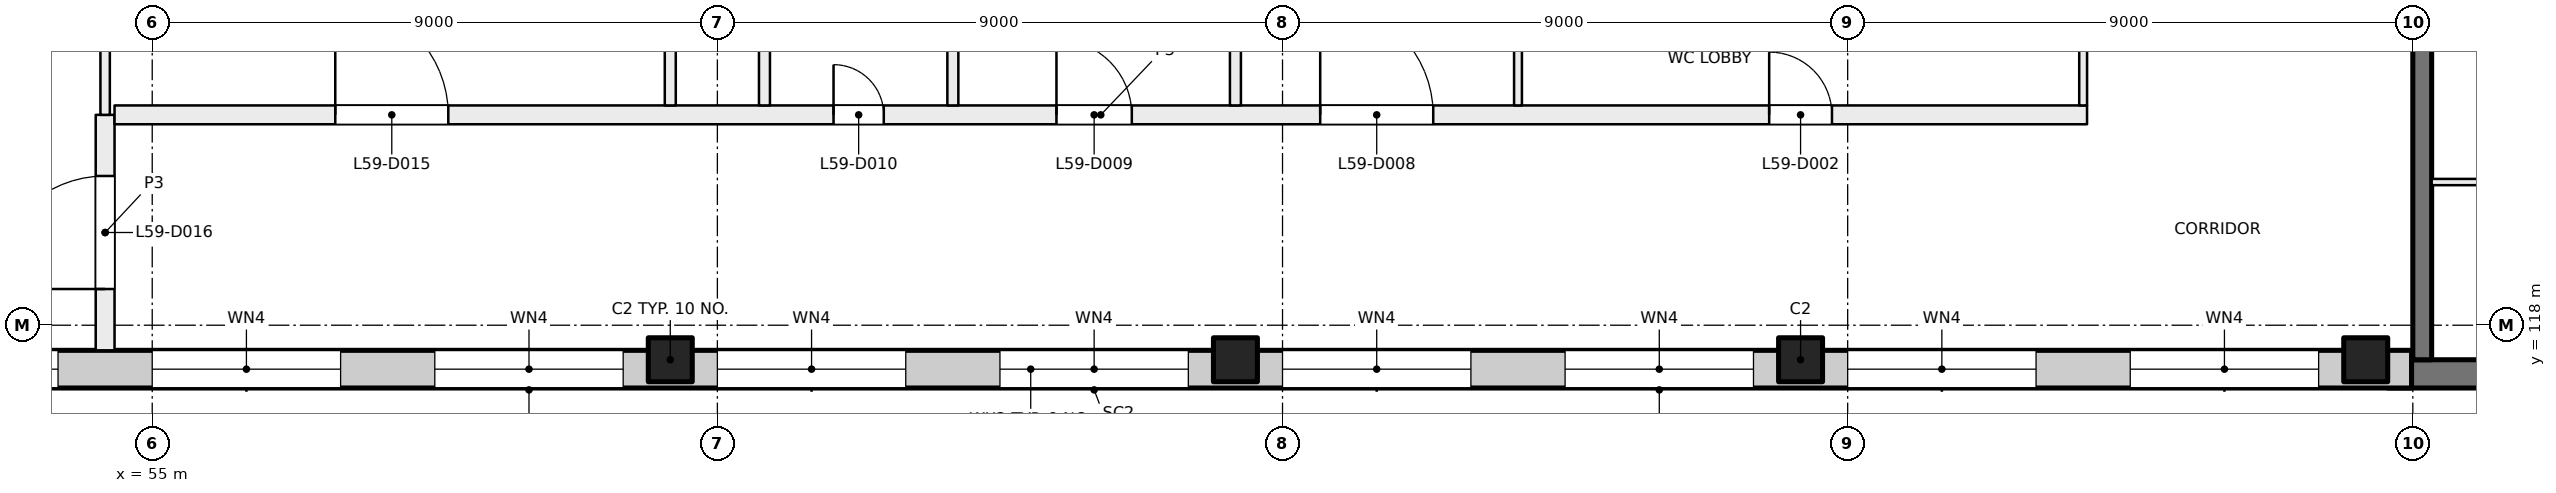
"""IFC4 building model, lengths in metres.
Left out: names, types, materials, properties, quantities, classifications, styles, units other than length and angle.
Written with IfcOpenShell. Run it as: python <this file> out.ifc"""

import sys

from ifc_helpers import new_model, si_unit, direction, frame, frame_2d, origin, origin_2d, place, context, subcontext, project, spatial, rectangle, extrude, element, fill, save


model = new_model("IFC4")
c1 = context("Model", 3, precision=1e-05, world=origin(), true_north=direction((0.0, 1.0)))
c2 = subcontext(c1, "Body", "Model", "MODEL_VIEW")
j1 = project(units=[si_unit("LENGTHUNIT", "METRE"), si_unit("PLANEANGLEUNIT", "RADIAN")], contexts=[c1])
p1 = place(None, origin())
s1 = spatial("IfcSite", under=j1, at=p1, CompositionType="ELEMENT")
p2 = place(p1, origin())
s2 = spatial("IfcBuilding", under=s1, at=p2, CompositionType="ELEMENT")
p3 = place(p2, frame((0.0, 0.0, 249.5)))
s3 = spatial("IfcBuildingStorey", under=s2, at=p3, CompositionType="ELEMENT", Elevation=249.5)
for number, where, z_axis, x_axis in (
    (1, (63.25, 117.45, 0.0), (0.0, 0.0, 1.0), (1.0, 0.0, 0.0)),
    (2, (72.25, 117.45, 0.0), (0.0, 0.0, 1.0), (1.0, 0.0, 0.0)),
    (3, (81.25, 117.45, 0.0), (0.0, 0.0, 1.0), (1.0, 0.0, 0.0)),
    (4, (90.25, 117.45, 0.0), (0.0, 0.0, 1.0), (1.0, 0.0, 0.0)),
):
    element("IfcColumn", number, at=place(p3, frame(where, z_axis=z_axis, x_axis=x_axis)), inside=s3, PredefinedType="COLUMN", context=c2, shape_type="SweptSolid", body=[
        extrude(rectangle(XDim=0.7, YDim=0.7, at=origin_2d()), origin(), (0.0, 0.0, 1.0), 4.0),
    ])
p4 = place(p3, frame((99.6, 117.225, 0.0), z_axis=(0.0, 0.0, 1.0), x_axis=(-1.0, 0.0, 0.0)))
e5 = element("IfcWall", 5, at=p4, inside=s3, PredefinedType="SHEAR", context=c2, shape_type="SweptSolid", body=[
    extrude(rectangle(XDim=9.0, YDim=0.45, at=frame_2d((4.5, 0.0))), origin(), (0.0, 0.0, 1.0), 4.0),
])
p5 = place(p3, frame((91.15, 126.2, 0.0), z_axis=(0.0, 0.0, 1.0), x_axis=(0.0, -1.0, 0.0)))
e6 = element("IfcWall", 6, at=p5, inside=s3, PredefinedType="SHEAR", context=c2, shape_type="SweptSolid", body=[
    extrude(rectangle(XDim=8.75, YDim=0.3, at=frame_2d((4.375, 0.0))), origin(), (0.0, 0.0, 1.0), 4.0),
])
p6 = place(p3, frame((90.98, 117.3, 0.0), z_axis=(0.0, 0.0, 1.0), x_axis=(-1.0, 0.0, 0.0)))
e7 = element("IfcWall", 7, at=p6, inside=s3, PredefinedType="SOLIDWALL", context=c2, shape_type="SweptSolid", body=[
    extrude(rectangle(XDim=43.98, YDim=0.6, at=frame_2d((21.99, 0.0))), origin(), (0.0, 0.0, 1.0), 3.625),
])
p7 = place(p6, frame((1.48, 0.0, 0.9)))
e8 = element("IfcOpeningElement", 8, at=p7, cuts=e7, PredefinedType="OPENING", context=c2, shape_type="SweptSolid", body=[
    extrude(rectangle(XDim=3.0, YDim=2.4, at=frame_2d((1.5, 1.2))), frame((0.0, 0.31, 0.0), z_axis=(0.0, -1.0, 0.0), x_axis=(1.0, 0.0, 0.0)), (0.0, 0.0, 1.0), 0.62),
])
p8 = place(p6, frame((5.98, 0.0, 0.9)))
e9 = element("IfcOpeningElement", 9, at=p8, cuts=e7, PredefinedType="OPENING", context=c2, shape_type="SweptSolid", body=[
    extrude(rectangle(XDim=3.0, YDim=2.4, at=frame_2d((1.5, 1.2))), frame((0.0, 0.31, 0.0), z_axis=(0.0, -1.0, 0.0), x_axis=(1.0, 0.0, 0.0)), (0.0, 0.0, 1.0), 0.62),
])
p9 = place(p6, frame((10.48, 0.0, 0.9)))
e10 = element("IfcOpeningElement", 10, at=p9, cuts=e7, PredefinedType="OPENING", context=c2, shape_type="SweptSolid", body=[
    extrude(rectangle(XDim=3.0, YDim=2.4, at=frame_2d((1.5, 1.2))), frame((0.0, 0.31, 0.0), z_axis=(0.0, -1.0, 0.0), x_axis=(1.0, 0.0, 0.0)), (0.0, 0.0, 1.0), 0.62),
])
p10 = place(p6, frame((14.98, 0.0, 0.9)))
e11 = element("IfcOpeningElement", 11, at=p10, cuts=e7, PredefinedType="OPENING", context=c2, shape_type="SweptSolid", body=[
    extrude(rectangle(XDim=3.0, YDim=2.4, at=frame_2d((1.5, 1.2))), frame((0.0, 0.31, 0.0), z_axis=(0.0, -1.0, 0.0), x_axis=(1.0, 0.0, 0.0)), (0.0, 0.0, 1.0), 0.62),
])
p11 = place(p6, frame((19.48, 0.0, 0.9)))
e12 = element("IfcOpeningElement", 12, at=p11, cuts=e7, PredefinedType="OPENING", context=c2, shape_type="SweptSolid", body=[
    extrude(rectangle(XDim=3.0, YDim=2.4, at=frame_2d((1.5, 1.2))), frame((0.0, 0.31, 0.0), z_axis=(0.0, -1.0, 0.0), x_axis=(1.0, 0.0, 0.0)), (0.0, 0.0, 1.0), 0.62),
])
p12 = place(p6, frame((23.98, 0.0, 0.9)))
e13 = element("IfcOpeningElement", 13, at=p12, cuts=e7, PredefinedType="OPENING", context=c2, shape_type="SweptSolid", body=[
    extrude(rectangle(XDim=3.0, YDim=2.4, at=frame_2d((1.5, 1.2))), frame((0.0, 0.31, 0.0), z_axis=(0.0, -1.0, 0.0), x_axis=(1.0, 0.0, 0.0)), (0.0, 0.0, 1.0), 0.62),
])
p13 = place(p6, frame((28.48, 0.0, 0.9)))
e14 = element("IfcOpeningElement", 14, at=p13, cuts=e7, PredefinedType="OPENING", context=c2, shape_type="SweptSolid", body=[
    extrude(rectangle(XDim=3.0, YDim=2.4, at=frame_2d((1.5, 1.2))), frame((0.0, 0.31, 0.0), z_axis=(0.0, -1.0, 0.0), x_axis=(1.0, 0.0, 0.0)), (0.0, 0.0, 1.0), 0.62),
])
p14 = place(p6, frame((32.98, 0.0, 0.9)))
e15 = element("IfcOpeningElement", 15, at=p14, cuts=e7, PredefinedType="OPENING", context=c2, shape_type="SweptSolid", body=[
    extrude(rectangle(XDim=3.0, YDim=2.4, at=frame_2d((1.5, 1.2))), frame((0.0, 0.31, 0.0), z_axis=(0.0, -1.0, 0.0), x_axis=(1.0, 0.0, 0.0)), (0.0, 0.0, 1.0), 0.62),
])
p15 = place(p6, frame((37.48, 0.0, 0.9)))
e16 = element("IfcOpeningElement", 16, at=p15, cuts=e7, PredefinedType="OPENING", context=c2, shape_type="SweptSolid", body=[
    extrude(rectangle(XDim=3.0, YDim=2.4, at=frame_2d((1.5, 1.2))), frame((0.0, 0.31, 0.0), z_axis=(0.0, -1.0, 0.0), x_axis=(1.0, 0.0, 0.0)), (0.0, 0.0, 1.0), 0.62),
])
p16 = place(p3, frame((93.4, 120.28, 0.0), z_axis=(0.0, 0.0, 1.0), x_axis=(-1.0, 0.0, 0.0)))
e17 = element("IfcWall", 17, at=p16, inside=s3, PredefinedType="PARTITIONING", context=c2, shape_type="SweptSolid", body=[
    extrude(rectangle(XDim=2.1, YDim=0.1, at=frame_2d((1.05, 0.0))), origin(), (0.0, 0.0, 1.0), 3.625),
])
p17 = place(p3, frame((54.25, 117.6, 0.0), z_axis=(0.0, 0.0, 1.0), x_axis=(0.0, 1.0, 0.0)))
e18 = element("IfcWall", 18, at=p17, inside=s3, PredefinedType="PARTITIONING", context=c2, shape_type="SweptSolid", body=[
    extrude(rectangle(XDim=3.75, YDim=0.3, at=frame_2d((1.875, 0.0))), origin(), (0.0, 0.0, 1.0), 3.625),
])
p18 = place(p17, frame((0.977, 0.0, 0.0)))
e19 = element("IfcOpeningElement", 19, at=p18, cuts=e18, PredefinedType="OPENING", context=c2, shape_type="SweptSolid", body=[
    extrude(rectangle(XDim=1.8, YDim=2.1, at=frame_2d((0.9, 1.05))), frame((0.0, 0.16, 0.0), z_axis=(0.0, -1.0, 0.0), x_axis=(1.0, 0.0, 0.0)), (0.0, 0.0, 1.0), 0.32),
])
p19 = place(p3, frame((54.25, 121.35, 0.0), z_axis=(0.0, 0.0, 1.0), x_axis=(0.0, 1.0, 0.0)))
e20 = element("IfcWall", 20, at=p19, inside=s3, PredefinedType="PARTITIONING", context=c2, shape_type="SweptSolid", body=[
    extrude(rectangle(XDim=17.05, YDim=0.15, at=frame_2d((8.525, 0.0))), origin(), (0.0, 0.0, 1.0), 3.625),
])
p20 = place(p3, frame((54.4, 121.35, 0.0), z_axis=(0.0, 0.0, 1.0), x_axis=(1.0, 0.0, 0.0)))
e21 = element("IfcWall", 21, at=p20, inside=s3, PredefinedType="PARTITIONING", context=c2, shape_type="SweptSolid", body=[
    extrude(rectangle(XDim=31.412, YDim=0.3, at=frame_2d((15.706, 0.0))), origin(), (0.0, 0.0, 1.0), 3.625),
])
p21 = place(p20, frame((26.35, 0.0, 0.0)))
e22 = element("IfcOpeningElement", 22, at=p21, cuts=e21, PredefinedType="OPENING", context=c2, shape_type="SweptSolid", body=[
    extrude(rectangle(XDim=1.0, YDim=2.1, at=frame_2d((0.5, 1.05))), frame((0.0, 0.16, 0.0), z_axis=(0.0, -1.0, 0.0), x_axis=(1.0, 0.0, 0.0)), (0.0, 0.0, 1.0), 0.32),
])
p22 = place(p20, frame((19.2, 0.0, 0.0)))
e23 = element("IfcOpeningElement", 23, at=p22, cuts=e21, PredefinedType="OPENING", context=c2, shape_type="SweptSolid", body=[
    extrude(rectangle(XDim=1.8, YDim=2.1, at=frame_2d((0.9, 1.05))), frame((0.0, 0.16, 0.0), z_axis=(0.0, -1.0, 0.0), x_axis=(1.0, 0.0, 0.0)), (0.0, 0.0, 1.0), 0.32),
])
p23 = place(p20, frame((15.0, 0.0, 0.0)))
e24 = element("IfcOpeningElement", 24, at=p23, cuts=e21, PredefinedType="OPENING", context=c2, shape_type="SweptSolid", body=[
    extrude(rectangle(XDim=1.2, YDim=2.1, at=frame_2d((0.6, 1.05))), frame((0.0, 0.16, 0.0), z_axis=(0.0, -1.0, 0.0), x_axis=(1.0, 0.0, 0.0)), (0.0, 0.0, 1.0), 0.32),
])
p24 = place(p20, frame((11.45, 0.0, 0.0)))
e25 = element("IfcOpeningElement", 25, at=p24, cuts=e21, PredefinedType="OPENING", context=c2, shape_type="SweptSolid", body=[
    extrude(rectangle(XDim=0.8, YDim=2.1, at=frame_2d((0.4, 1.05))), frame((0.0, 0.16, 0.0), z_axis=(0.0, -1.0, 0.0), x_axis=(1.0, 0.0, 0.0)), (0.0, 0.0, 1.0), 0.32),
])
p25 = place(p20, frame((3.515, 0.0, 0.0)))
e26 = element("IfcOpeningElement", 26, at=p25, cuts=e21, PredefinedType="OPENING", context=c2, shape_type="SweptSolid", body=[
    extrude(rectangle(XDim=1.8, YDim=2.1, at=frame_2d((0.9, 1.05))), frame((0.0, 0.16, 0.0), z_axis=(0.0, -1.0, 0.0), x_axis=(1.0, 0.0, 0.0)), (0.0, 0.0, 1.0), 0.32),
])
p26 = place(p3, frame((63.25, 132.5, 0.0), z_axis=(0.0, 0.0, 1.0), x_axis=(0.0, -1.0, 0.0)))
e27 = element("IfcWall", 27, at=p26, inside=s3, PredefinedType="PARTITIONING", context=c2, shape_type="SweptSolid", body=[
    extrude(rectangle(XDim=11.0, YDim=0.175, at=frame_2d((5.5, 0.0))), origin(), (0.0, 0.0, 1.0), 3.625),
])
p27 = place(p26, frame((4.91, 0.0, 0.0)))
e28 = element("IfcOpeningElement", 28, at=p27, cuts=e27, PredefinedType="OPENING", context=c2, shape_type="SweptSolid", body=[
    extrude(rectangle(XDim=1.2, YDim=2.1, at=frame_2d((0.6, 1.05))), frame((0.0, 0.097, 0.0), z_axis=(0.0, -1.0, 0.0), x_axis=(1.0, 0.0, 0.0)), (0.0, 0.0, 1.0), 0.195),
])
for number, where, z_axis, x_axis in (
    (29, (64.75, 125.912, 0.0), (0.0, 0.0, 1.0), (0.0, -1.0, 0.0)),
    (30, (67.75, 121.5, 0.0), (0.0, 0.0, 1.0), (0.0, 1.0, 0.0)),
):
    element("IfcWall", number, at=place(p3, frame(where, z_axis=z_axis, x_axis=x_axis)), inside=s3, PredefinedType="PARTITIONING", context=c2, shape_type="SweptSolid", body=[
        extrude(rectangle(XDim=4.412, YDim=0.175, at=frame_2d((2.206, 0.0))), origin(), (0.0, 0.0, 1.0), 3.625),
    ])
p28 = place(p3, frame((72.25, 121.5, 0.0), z_axis=(0.0, 0.0, 1.0), x_axis=(0.0, 1.0, 0.0)))
e31 = element("IfcWall", 31, at=p28, inside=s3, PredefinedType="PARTITIONING", context=c2, shape_type="SweptSolid", body=[
    extrude(rectangle(XDim=8.4, YDim=0.175, at=frame_2d((4.2, 0.0))), origin(), (0.0, 0.0, 1.0), 3.625),
])
p29 = place(p3, frame((76.75, 121.5, 0.0), z_axis=(0.0, 0.0, 1.0), x_axis=(0.0, 1.0, 0.0)))
e32 = element("IfcWall", 32, at=p29, inside=s3, PredefinedType="PARTITIONING", context=c2, shape_type="SweptSolid", body=[
    extrude(rectangle(XDim=4.562, YDim=0.125, at=frame_2d((2.281, 0.0))), origin(), (0.0, 0.0, 1.0), 3.625),
])
p30 = place(p3, frame((85.75, 121.5, 0.0), z_axis=(0.0, 0.0, 1.0), x_axis=(0.0, 1.0, 0.0)))
e33 = element("IfcWall", 33, at=p30, inside=s3, PredefinedType="PARTITIONING", context=c2, shape_type="SweptSolid", body=[
    extrude(rectangle(XDim=4.503, YDim=0.125, at=frame_2d((2.251, 0.0))), origin(), (0.0, 0.0, 1.0), 3.625),
])
p31 = place(p7, origin())
e34 = element("IfcWindow", 34, at=p31, inside=s3, PartitioningType="SINGLE_PANEL", PredefinedType="WINDOW", context=c2, shape_type="SweptSolid", body=[
    extrude(rectangle(XDim=3.0, YDim=2.4, at=frame_2d((1.5, 1.2))), frame((0.0, 0.03, 0.0), z_axis=(0.0, -1.0, 0.0), x_axis=(1.0, 0.0, 0.0)), (0.0, 0.0, 1.0), 0.06),
])
fill(e8, e34)
p32 = place(p8, origin())
e35 = element("IfcWindow", 35, at=p32, inside=s3, PartitioningType="SINGLE_PANEL", PredefinedType="WINDOW", context=c2, shape_type="SweptSolid", body=[
    extrude(rectangle(XDim=3.0, YDim=2.4, at=frame_2d((1.5, 1.2))), frame((0.0, 0.03, 0.0), z_axis=(0.0, -1.0, 0.0), x_axis=(1.0, 0.0, 0.0)), (0.0, 0.0, 1.0), 0.06),
])
fill(e9, e35)
p33 = place(p9, origin())
e36 = element("IfcWindow", 36, at=p33, inside=s3, PartitioningType="SINGLE_PANEL", PredefinedType="WINDOW", context=c2, shape_type="SweptSolid", body=[
    extrude(rectangle(XDim=3.0, YDim=2.4, at=frame_2d((1.5, 1.2))), frame((0.0, 0.03, 0.0), z_axis=(0.0, -1.0, 0.0), x_axis=(1.0, 0.0, 0.0)), (0.0, 0.0, 1.0), 0.06),
])
fill(e10, e36)
p34 = place(p10, origin())
e37 = element("IfcWindow", 37, at=p34, inside=s3, PartitioningType="SINGLE_PANEL", PredefinedType="WINDOW", context=c2, shape_type="SweptSolid", body=[
    extrude(rectangle(XDim=3.0, YDim=2.4, at=frame_2d((1.5, 1.2))), frame((0.0, 0.03, 0.0), z_axis=(0.0, -1.0, 0.0), x_axis=(1.0, 0.0, 0.0)), (0.0, 0.0, 1.0), 0.06),
])
fill(e11, e37)
p35 = place(p11, origin())
e38 = element("IfcWindow", 38, at=p35, inside=s3, PartitioningType="SINGLE_PANEL", PredefinedType="WINDOW", context=c2, shape_type="SweptSolid", body=[
    extrude(rectangle(XDim=3.0, YDim=2.4, at=frame_2d((1.5, 1.2))), frame((0.0, 0.03, 0.0), z_axis=(0.0, -1.0, 0.0), x_axis=(1.0, 0.0, 0.0)), (0.0, 0.0, 1.0), 0.06),
])
fill(e12, e38)
p36 = place(p12, origin())
e39 = element("IfcWindow", 39, at=p36, inside=s3, PartitioningType="SINGLE_PANEL", PredefinedType="WINDOW", context=c2, shape_type="SweptSolid", body=[
    extrude(rectangle(XDim=3.0, YDim=2.4, at=frame_2d((1.5, 1.2))), frame((0.0, 0.03, 0.0), z_axis=(0.0, -1.0, 0.0), x_axis=(1.0, 0.0, 0.0)), (0.0, 0.0, 1.0), 0.06),
])
fill(e13, e39)
p37 = place(p13, origin())
e40 = element("IfcWindow", 40, at=p37, inside=s3, PartitioningType="SINGLE_PANEL", PredefinedType="WINDOW", context=c2, shape_type="SweptSolid", body=[
    extrude(rectangle(XDim=3.0, YDim=2.4, at=frame_2d((1.5, 1.2))), frame((0.0, 0.03, 0.0), z_axis=(0.0, -1.0, 0.0), x_axis=(1.0, 0.0, 0.0)), (0.0, 0.0, 1.0), 0.06),
])
fill(e14, e40)
p38 = place(p14, origin())
e41 = element("IfcWindow", 41, at=p38, inside=s3, PartitioningType="SINGLE_PANEL", PredefinedType="WINDOW", context=c2, shape_type="SweptSolid", body=[
    extrude(rectangle(XDim=3.0, YDim=2.4, at=frame_2d((1.5, 1.2))), frame((0.0, 0.03, 0.0), z_axis=(0.0, -1.0, 0.0), x_axis=(1.0, 0.0, 0.0)), (0.0, 0.0, 1.0), 0.06),
])
fill(e15, e41)
p39 = place(p15, origin())
e42 = element("IfcWindow", 42, at=p39, inside=s3, PartitioningType="SINGLE_PANEL", PredefinedType="WINDOW", context=c2, shape_type="SweptSolid", body=[
    extrude(rectangle(XDim=3.0, YDim=2.4, at=frame_2d((1.5, 1.2))), frame((0.0, 0.03, 0.0), z_axis=(0.0, -1.0, 0.0), x_axis=(1.0, 0.0, 0.0)), (0.0, 0.0, 1.0), 0.06),
])
fill(e16, e42)
p40 = place(p21, origin())
e43 = element("IfcDoor", 43, at=p40, inside=s3, OperationType="SINGLE_SWING_LEFT", PredefinedType="DOOR", context=c2, shape_type="SweptSolid", body=[
    extrude(rectangle(XDim=1.0, YDim=2.1, at=frame_2d((0.5, 1.05))), frame((0.0, 0.025, 0.0), z_axis=(0.0, -1.0, 0.0), x_axis=(1.0, 0.0, 0.0)), (0.0, 0.0, 1.0), 0.05),
])
fill(e22, e43)
p41 = place(p22, origin())
e44 = element("IfcDoor", 44, at=p41, inside=s3, OperationType="DOUBLE_DOOR_SINGLE_SWING", PredefinedType="DOOR", context=c2, shape_type="SweptSolid", body=[
    extrude(rectangle(XDim=1.8, YDim=2.1, at=frame_2d((0.9, 1.05))), frame((0.0, 0.025, 0.0), z_axis=(0.0, -1.0, 0.0), x_axis=(1.0, 0.0, 0.0)), (0.0, 0.0, 1.0), 0.05),
])
fill(e23, e44)
p42 = place(p23, origin())
e45 = element("IfcDoor", 45, at=p42, inside=s3, OperationType="DOUBLE_DOOR_SINGLE_SWING", PredefinedType="DOOR", context=c2, shape_type="SweptSolid", body=[
    extrude(rectangle(XDim=1.2, YDim=2.1, at=frame_2d((0.6, 1.05))), frame((0.0, 0.025, 0.0), z_axis=(0.0, -1.0, 0.0), x_axis=(1.0, 0.0, 0.0)), (0.0, 0.0, 1.0), 0.05),
])
fill(e24, e45)
p43 = place(p24, origin())
e46 = element("IfcDoor", 46, at=p43, inside=s3, OperationType="SINGLE_SWING_LEFT", PredefinedType="DOOR", context=c2, shape_type="SweptSolid", body=[
    extrude(rectangle(XDim=0.8, YDim=2.1, at=frame_2d((0.4, 1.05))), frame((0.0, 0.025, 0.0), z_axis=(0.0, -1.0, 0.0), x_axis=(1.0, 0.0, 0.0)), (0.0, 0.0, 1.0), 0.05),
])
fill(e25, e46)
p44 = place(p25, origin())
e47 = element("IfcDoor", 47, at=p44, inside=s3, OperationType="DOUBLE_DOOR_SINGLE_SWING", PredefinedType="DOOR", context=c2, shape_type="SweptSolid", body=[
    extrude(rectangle(XDim=1.8, YDim=2.1, at=frame_2d((0.9, 1.05))), frame((0.0, 0.025, 0.0), z_axis=(0.0, -1.0, 0.0), x_axis=(1.0, 0.0, 0.0)), (0.0, 0.0, 1.0), 0.05),
])
fill(e26, e47)
p45 = place(p18, origin())
e48 = element("IfcDoor", 48, at=p45, inside=s3, OperationType="DOUBLE_DOOR_SINGLE_SWING", PredefinedType="DOOR", context=c2, shape_type="SweptSolid", body=[
    extrude(rectangle(XDim=1.8, YDim=2.1, at=frame_2d((0.9, 1.05))), frame((0.0, 0.025, 0.0), z_axis=(0.0, -1.0, 0.0), x_axis=(1.0, 0.0, 0.0)), (0.0, 0.0, 1.0), 0.05),
])
fill(e19, e48)
save(model, sys.argv[1])
